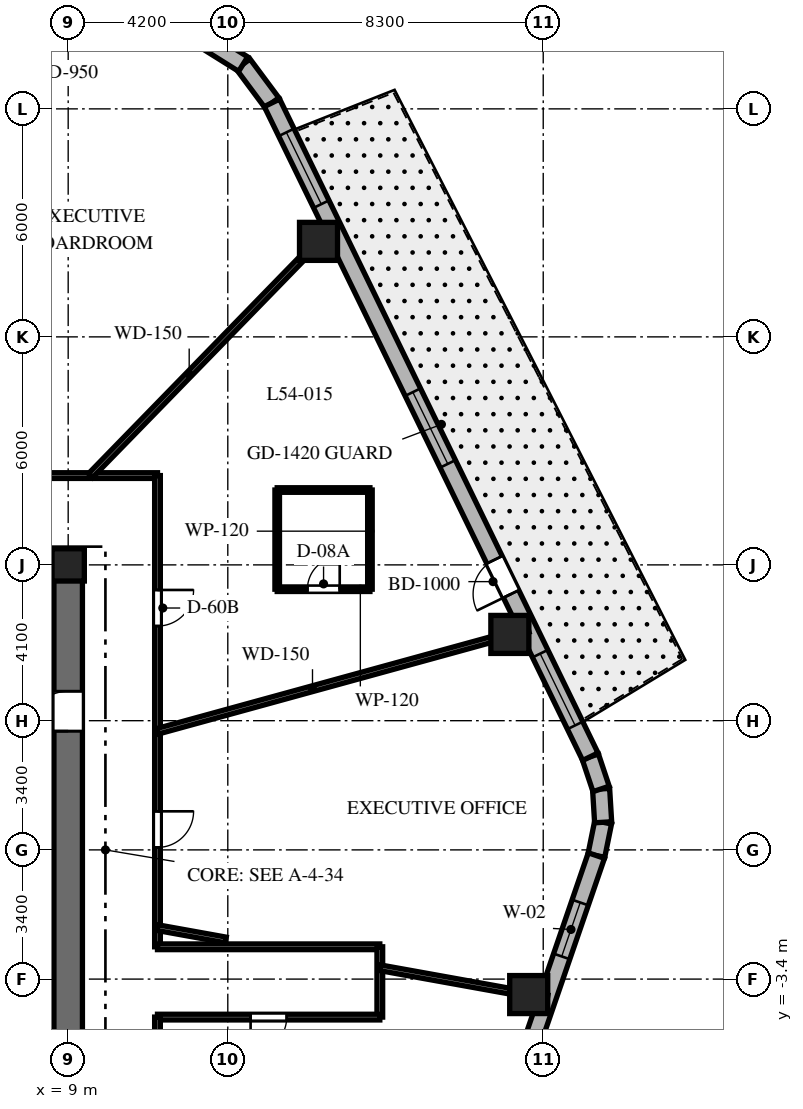
"""IFC4 building model, lengths in metres.
Left out: names, types, materials, properties, quantities, classifications, styles, units other than length and angle.
Written with IfcOpenShell. Run it as: python <this file> out.ifc"""

import sys

from ifc_helpers import new_model, si_unit, direction, frame, frame_2d, origin, origin_2d, place, context, subcontext, project, spatial, rectangle, extrude, element, fill, save


model = new_model("IFC4")
c1 = context("Model", 3, precision=1e-05, world=origin(), true_north=direction((0.0, 1.0)))
c2 = subcontext(c1, "Body", "Model", "MODEL_VIEW")
j1 = project(units=[si_unit("LENGTHUNIT", "METRE"), si_unit("PLANEANGLEUNIT", "RADIAN")], contexts=[c1])
p1 = place(None, origin())
s1 = spatial("IfcSite", under=j1, at=p1, CompositionType="ELEMENT")
p2 = place(p1, origin())
s2 = spatial("IfcBuilding", under=s1, at=p2, CompositionType="ELEMENT")
p3 = place(p2, frame((0.0, 0.0, 217.9)))
s3 = spatial("IfcBuildingStorey", under=s2, at=p3, CompositionType="ELEMENT", Elevation=217.9)
p4 = place(p3, frame((1.85, 7.5, 0.0), z_axis=(0.0, 0.0, 1.0), x_axis=(1.0, 0.0, 0.0)))
e1 = element("IfcWall", 1, at=p4, inside=s3, PredefinedType="SHEAR", context=c2, shape_type="SweptSolid", body=[
    extrude(rectangle(XDim=7.525, YDim=0.75, at=frame_2d((3.762, 0.0))), origin(), (0.0, 0.0, 1.0), 3.8),
])
p5 = place(p3, frame((9.0, -7.125, 0.0), z_axis=(0.0, 0.0, 1.0), x_axis=(0.0, 1.0, 0.0)))
e2 = element("IfcWall", 2, at=p5, inside=s3, PredefinedType="SHEAR", context=c2, shape_type="SweptSolid", body=[
    extrude(rectangle(XDim=14.25, YDim=0.75, at=frame_2d((7.125, 0.0))), origin(), (0.0, 0.0, 1.0), 3.8),
])
p6 = place(p5, frame((10.25, 0.0, 0.0)))
e3 = element("IfcOpeningElement", 3, at=p6, cuts=e2, PredefinedType="OPENING", context=c2, shape_type="SweptSolid", body=[
    extrude(rectangle(XDim=1.05, YDim=2.15, at=frame_2d((0.525, 1.075))), frame((0.0, 0.385, 0.0), z_axis=(0.0, -1.0, 0.0), x_axis=(1.0, 0.0, 0.0)), (0.0, 0.0, 1.0), 0.77),
])
p7 = place(p3, frame((9.0, 7.5, 0.0), z_axis=(0.0, 0.0, 1.0), x_axis=(1.0, 0.0, 0.0)))
e4 = element("IfcColumn", 4, at=p7, inside=s3, PredefinedType="COLUMN", context=c2, shape_type="SweptSolid", body=[
    extrude(rectangle(XDim=0.85, YDim=0.85, at=origin_2d()), origin(), (0.0, 0.0, 1.0), 3.8),
])
for number, where, z_axis, x_axis in (
    (5, (21.118, -3.807, 0.0), (0.0, 0.0, 1.0), (1.0, 0.0, 0.0)),
    (6, (20.622, 5.67, 0.0), (0.0, 0.0, 1.0), (1.0, 0.0, 0.0)),
    (7, (15.587, 16.013, 0.0), (0.0, 0.0, 1.0), (1.0, 0.0, 0.0)),
):
    element("IfcColumn", number, at=place(p3, frame(where, z_axis=z_axis, x_axis=x_axis)), inside=s3, PredefinedType="COLUMN", context=c2, shape_type="SweptSolid", body=[
        extrude(rectangle(XDim=1.0, YDim=1.0, at=origin_2d()), origin(), (0.0, 0.0, 1.0), 3.8),
    ])
p8 = place(p3, frame((22.898, -0.15, 0.0), z_axis=(0.0, 0.0, 1.0), x_axis=(0.199055826889, 0.979988151858, 0.0)))
e8 = element("IfcWall", 8, at=p8, inside=s3, PredefinedType="SOLIDWALL", context=c2, shape_type="SweptSolid", body=[
    extrude(rectangle(XDim=0.894, YDim=0.45, at=frame_2d((0.447, 0.0))), origin(), (0.0, 0.0, 1.0), 3.5),
])
p9 = place(p3, frame((23.076, 0.727, 0.0), z_axis=(0.0, 0.0, 1.0), x_axis=(-0.060805222108, 0.998149650586, 0.0)))
e9 = element("IfcWall", 9, at=p9, inside=s3, PredefinedType="SOLIDWALL", context=c2, shape_type="SweptSolid", body=[
    extrude(rectangle(XDim=0.879, YDim=0.45, at=frame_2d((0.44, 0.0))), origin(), (0.0, 0.0, 1.0), 3.5),
])
p10 = place(p3, frame((23.023, 1.604, 0.0), z_axis=(0.0, 0.0, 1.0), x_axis=(-0.316801227695, 0.948491951537, 0.0)))
e10 = element("IfcWall", 10, at=p10, inside=s3, PredefinedType="SOLIDWALL", context=c2, shape_type="SweptSolid", body=[
    extrude(rectangle(XDim=0.894, YDim=0.45, at=frame_2d((0.447, 0.0))), origin(), (0.0, 0.0, 1.0), 3.5),
])
p11 = place(p3, frame((14.362, 19.658, 0.0), z_axis=(0.0, 0.0, 1.0), x_axis=(-0.596642462792, 0.80250717853, 0.0)))
e11 = element("IfcWall", 11, at=p11, inside=s3, PredefinedType="SOLIDWALL", context=c2, shape_type="SweptSolid", body=[
    extrude(rectangle(XDim=1.27, YDim=0.45, at=frame_2d((0.635, 0.0))), origin(), (0.0, 0.0, 1.0), 3.5),
])
p12 = place(p3, frame((13.604, 20.678, 0.0), z_axis=(0.0, 0.0, 1.0), x_axis=(-0.847910404124, 0.53013955387, 0.0)))
e12 = element("IfcWall", 12, at=p12, inside=s3, PredefinedType="SOLIDWALL", context=c2, shape_type="SweptSolid", body=[
    extrude(rectangle(XDim=1.249, YDim=0.45, at=frame_2d((0.624, 0.0))), origin(), (0.0, 0.0, 1.0), 3.5),
])
p13 = place(p3, frame((16.324, -19.275, 0.0), z_axis=(0.0, 0.0, 1.0), x_axis=(0.325083142304, 0.945685439557, 0.0)))
e13 = element("IfcWall", 13, at=p13, inside=s3, PredefinedType="SOLIDWALL", context=c2, shape_type="SweptSolid", body=[
    extrude(rectangle(XDim=20.224, YDim=0.45, at=frame_2d((10.112, 0.0))), origin(), (0.0, 0.0, 1.0), 3.5),
])
p14 = place(p13, frame((1.253, 0.0, 0.8)))
e14 = element("IfcOpeningElement", 14, at=p14, cuts=e13, PredefinedType="OPENING", context=c2, shape_type="SweptSolid", body=[
    extrude(rectangle(XDim=1.5, YDim=1.8, at=frame_2d((0.75, 0.9))), frame((0.0, 0.235, 0.0), z_axis=(0.0, -1.0, 0.0), x_axis=(1.0, 0.0, 0.0)), (0.0, 0.0, 1.0), 0.47),
])
p15 = place(p13, frame((9.309, 0.0, 0.8)))
e15 = element("IfcOpeningElement", 15, at=p15, cuts=e13, PredefinedType="OPENING", context=c2, shape_type="SweptSolid", body=[
    extrude(rectangle(XDim=1.5, YDim=1.8, at=frame_2d((0.75, 0.9))), frame((0.0, 0.235, 0.0), z_axis=(0.0, -1.0, 0.0), x_axis=(1.0, 0.0, 0.0)), (0.0, 0.0, 1.0), 0.47),
])
p16 = place(p13, frame((17.418, 0.0, 0.8)))
e16 = element("IfcOpeningElement", 16, at=p16, cuts=e13, PredefinedType="OPENING", context=c2, shape_type="SweptSolid", body=[
    extrude(rectangle(XDim=1.5, YDim=1.8, at=frame_2d((0.75, 0.9))), frame((0.0, 0.235, 0.0), z_axis=(0.0, -1.0, 0.0), x_axis=(1.0, 0.0, 0.0)), (0.0, 0.0, 1.0), 0.47),
])
p17 = place(p3, frame((22.74, 2.452, 0.0), z_axis=(0.0, 0.0, 1.0), x_axis=(-0.437753424814, 0.899095066755, 0.0)))
e17 = element("IfcWall", 17, at=p17, inside=s3, PredefinedType="SOLIDWALL", context=c2, shape_type="SweptSolid", body=[
    extrude(rectangle(XDim=19.137, YDim=0.45, at=frame_2d((9.569, 0.0))), origin(), (0.0, 0.0, 1.0), 3.5),
])
p18 = place(p17, frame((4.763, 0.0, 0.0)))
e18 = element("IfcOpeningElement", 18, at=p18, cuts=e17, PredefinedType="OPENING", context=c2, shape_type="SweptSolid", body=[
    extrude(rectangle(XDim=1.0, YDim=2.15, at=frame_2d((0.5, 1.075))), frame((0.0, 0.235, 0.0), z_axis=(0.0, -1.0, 0.0), x_axis=(1.0, 0.0, 0.0)), (0.0, 0.0, 1.0), 0.47),
])
p19 = place(p17, frame((8.57, 0.0, 0.8)))
e19 = element("IfcOpeningElement", 19, at=p19, cuts=e17, PredefinedType="OPENING", context=c2, shape_type="SweptSolid", body=[
    extrude(rectangle(XDim=2.1, YDim=1.85, at=frame_2d((1.05, 0.925))), frame((0.0, 0.235, 0.0), z_axis=(0.0, -1.0, 0.0), x_axis=(1.0, 0.0, 0.0)), (0.0, 0.0, 1.0), 0.47),
])
p20 = place(p17, frame((16.173, 0.0, 0.8)))
e20 = element("IfcOpeningElement", 20, at=p20, cuts=e17, PredefinedType="OPENING", context=c2, shape_type="SweptSolid", body=[
    extrude(rectangle(XDim=2.1, YDim=1.85, at=frame_2d((1.05, 0.925))), frame((0.0, 0.235, 0.0), z_axis=(0.0, -1.0, 0.0), x_axis=(1.0, 0.0, 0.0)), (0.0, 0.0, 1.0), 0.47),
])
p21 = place(p17, frame((0.916, 0.0, 0.8)))
e21 = element("IfcOpeningElement", 21, at=p21, cuts=e17, PredefinedType="OPENING", context=c2, shape_type="SweptSolid", body=[
    extrude(rectangle(XDim=2.1, YDim=1.85, at=frame_2d((1.05, 0.925))), frame((0.0, 0.235, 0.0), z_axis=(0.0, -1.0, 0.0), x_axis=(1.0, 0.0, 0.0)), (0.0, 0.0, 1.0), 0.47),
])
p22 = place(p3, frame((0.92, 9.85, 0.0), z_axis=(0.0, 0.0, 1.0), x_axis=(1.0, 0.0, 0.0)))
e22 = element("IfcWall", 22, at=p22, inside=s3, PredefinedType="PARTITIONING", context=c2, shape_type="SweptSolid", body=[
    extrude(rectangle(XDim=10.43, YDim=0.15, at=frame_2d((5.215, 0.0))), origin(), (0.0, 0.0, 1.0), 2.99),
])
p23 = place(p22, frame((4.949, 0.0, 0.0)))
e23 = element("IfcOpeningElement", 23, at=p23, cuts=e22, PredefinedType="OPENING", context=c2, shape_type="SweptSolid", body=[
    extrude(rectangle(XDim=0.95, YDim=2.03, at=frame_2d((0.475, 1.015))), frame((0.0, 0.085, 0.0), z_axis=(0.0, -1.0, 0.0), x_axis=(1.0, 0.0, 0.0)), (0.0, 0.0, 1.0), 0.17),
])
p24 = place(p3, frame((11.35, 9.85, 0.0), z_axis=(0.0, 0.0, 1.0), x_axis=(0.0, -1.0, 0.0)))
e24 = element("IfcWall", 24, at=p24, inside=s3, PredefinedType="PARTITIONING", context=c2, shape_type="SweptSolid", body=[
    extrude(rectangle(XDim=12.4, YDim=0.15, at=frame_2d((6.2, 0.0))), origin(), (0.0, 0.0, 1.0), 2.99),
])
p25 = place(p24, frame((3.01, 0.0, 0.0)))
e25 = element("IfcOpeningElement", 25, at=p25, cuts=e24, PredefinedType="OPENING", context=c2, shape_type="SweptSolid", body=[
    extrude(rectangle(XDim=0.95, YDim=2.03, at=frame_2d((0.475, 1.015))), frame((0.0, 0.085, 0.0), z_axis=(0.0, -1.0, 0.0), x_axis=(1.0, 0.0, 0.0)), (0.0, 0.0, 1.0), 0.17),
])
p26 = place(p24, frame((8.835, 0.0, 0.0)))
e26 = element("IfcOpeningElement", 26, at=p26, cuts=e24, PredefinedType="OPENING", context=c2, shape_type="SweptSolid", body=[
    extrude(rectangle(XDim=0.95, YDim=2.03, at=frame_2d((0.475, 1.015))), frame((0.0, 0.085, 0.0), z_axis=(0.0, -1.0, 0.0), x_axis=(1.0, 0.0, 0.0)), (0.0, 0.0, 1.0), 0.17),
])
p27 = place(p3, frame((11.35, -2.55, 0.0), z_axis=(0.0, 0.0, 1.0), x_axis=(1.0, 0.0, 0.0)))
e27 = element("IfcWall", 27, at=p27, inside=s3, PredefinedType="PARTITIONING", context=c2, shape_type="SweptSolid", body=[
    extrude(rectangle(XDim=5.85, YDim=0.15, at=frame_2d((2.925, 0.0))), origin(), (0.0, 0.0, 1.0), 2.941),
])
p28 = place(p3, frame((17.2, -2.55, 0.0), z_axis=(0.0, 0.0, 1.0), x_axis=(0.0, -1.0, 0.0)))
e28 = element("IfcWall", 28, at=p28, inside=s3, PredefinedType="PARTITIONING", context=c2, shape_type="SweptSolid", body=[
    extrude(rectangle(XDim=1.85, YDim=0.15, at=frame_2d((0.925, 0.0))), origin(), (0.0, 0.0, 1.0), 2.941),
])
p29 = place(p3, frame((17.2, -4.4, 0.0), z_axis=(0.0, 0.0, 1.0), x_axis=(-1.0, 0.0, 0.0)))
e29 = element("IfcWall", 29, at=p29, inside=s3, PredefinedType="PARTITIONING", context=c2, shape_type="SweptSolid", body=[
    extrude(rectangle(XDim=5.85, YDim=0.15, at=frame_2d((2.925, 0.0))), origin(), (0.0, 0.0, 1.0), 2.941),
])
p30 = place(p29, frame((2.45, 0.0, 0.0)))
e30 = element("IfcOpeningElement", 30, at=p30, cuts=e29, PredefinedType="OPENING", context=c2, shape_type="SweptSolid", body=[
    extrude(rectangle(XDim=0.95, YDim=2.03, at=frame_2d((0.475, 1.015))), frame((0.0, 0.085, 0.0), z_axis=(0.0, -1.0, 0.0), x_axis=(1.0, 0.0, 0.0)), (0.0, 0.0, 1.0), 0.17),
])
p31 = place(p3, frame((11.35, -4.4, 0.0), z_axis=(0.0, 0.0, 1.0), x_axis=(0.0, -1.0, 0.0)))
e31 = element("IfcWall", 31, at=p31, inside=s3, PredefinedType="PARTITIONING", context=c2, shape_type="SweptSolid", body=[
    extrude(rectangle(XDim=5.45, YDim=0.15, at=frame_2d((2.725, 0.0))), origin(), (0.0, 0.0, 1.0), 2.99),
])
p32 = place(p3, frame((11.35, 3.121, 0.0), z_axis=(0.0, 0.0, 1.0), x_axis=(0.964212793822, 0.265129568758, 0.0)))
e32 = element("IfcWall", 32, at=p32, inside=s3, PredefinedType="PARTITIONING", context=c2, shape_type="SweptSolid", body=[
    extrude(rectangle(XDim=10.12, YDim=0.15, at=frame_2d((5.06, 0.0))), origin(), (0.0, 0.0, 1.0), 2.74),
])
p33 = place(p3, frame((9.588, 9.85, 0.0), z_axis=(0.0, 0.0, 1.0), x_axis=(0.697519469595, 0.716565830567, 0.0)))
e33 = element("IfcWall", 33, at=p33, inside=s3, PredefinedType="PARTITIONING", context=c2, shape_type="SweptSolid", body=[
    extrude(rectangle(XDim=9.126, YDim=0.15, at=frame_2d((4.563, 0.0))), origin(), (0.0, 0.0, 1.0), 2.74),
])
p34 = place(p3, frame((11.35, -2.046, 0.0), z_axis=(0.0, 0.0, 1.0), x_axis=(0.984127783205, -0.177461281195, 0.0)))
e34 = element("IfcWall", 34, at=p34, inside=s3, PredefinedType="PARTITIONING", context=c2, shape_type="SweptSolid", body=[
    extrude(rectangle(XDim=1.826, YDim=0.15, at=frame_2d((0.913, 0.0))), origin(), (0.0, 0.0, 1.0), 3.5),
])
p35 = place(p3, frame((17.2, -3.101, 0.0), z_axis=(0.0, 0.0, 1.0), x_axis=(0.98413465883, -0.177423147559, 0.0)))
e35 = element("IfcWall", 35, at=p35, inside=s3, PredefinedType="PARTITIONING", context=c2, shape_type="SweptSolid", body=[
    extrude(rectangle(XDim=4.482, YDim=0.15, at=frame_2d((2.241, 0.0))), origin(), (0.0, 0.0, 1.0), 2.74),
])
p36 = place(p3, frame((14.5, 6.86, 0.0), z_axis=(0.0, 0.0, 1.0), x_axis=(1.0, 0.0, 0.0)))
e36 = element("IfcWall", 36, at=p36, inside=s3, PredefinedType="PARTITIONING", context=c2, shape_type="SweptSolid", body=[
    extrude(rectangle(XDim=2.44, YDim=0.12, at=frame_2d((1.22, 0.0))), origin(), (0.0, 0.0, 1.0), 3.027),
])
p37 = place(p36, frame((0.795, 0.0, 0.0)))
e37 = element("IfcOpeningElement", 37, at=p37, cuts=e36, PredefinedType="OPENING", context=c2, shape_type="SweptSolid", body=[
    extrude(rectangle(XDim=0.85, YDim=2.03, at=frame_2d((0.425, 1.015))), frame((0.0, 0.07, 0.0), z_axis=(0.0, -1.0, 0.0), x_axis=(1.0, 0.0, 0.0)), (0.0, 0.0, 1.0), 0.14),
])
p38 = place(p3, frame((16.94, 6.86, 0.0), z_axis=(0.0, 0.0, 1.0), x_axis=(0.0, 1.0, 0.0)))
e38 = element("IfcWall", 38, at=p38, inside=s3, PredefinedType="PARTITIONING", context=c2, shape_type="SweptSolid", body=[
    extrude(rectangle(XDim=2.61, YDim=0.12, at=frame_2d((1.305, 0.0))), origin(), (0.0, 0.0, 1.0), 3.5),
])
p39 = place(p3, frame((16.94, 9.47, 0.0), z_axis=(0.0, 0.0, 1.0), x_axis=(-1.0, 0.0, 0.0)))
e39 = element("IfcWall", 39, at=p39, inside=s3, PredefinedType="PARTITIONING", context=c2, shape_type="SweptSolid", body=[
    extrude(rectangle(XDim=2.44, YDim=0.12, at=frame_2d((1.22, 0.0))), origin(), (0.0, 0.0, 1.0), 3.027),
])
p40 = place(p3, frame((14.5, 9.47, 0.0), z_axis=(0.0, 0.0, 1.0), x_axis=(0.0, -1.0, 0.0)))
e40 = element("IfcWall", 40, at=p40, inside=s3, PredefinedType="PARTITIONING", context=c2, shape_type="SweptSolid", body=[
    extrude(rectangle(XDim=2.61, YDim=0.12, at=frame_2d((1.305, 0.0))), origin(), (0.0, 0.0, 1.0), 3.5),
])
p41 = place(p16, origin())
e41 = element("IfcWindow", 41, at=p41, inside=s3, PartitioningType="SINGLE_PANEL", PredefinedType="WINDOW", context=c2, shape_type="SweptSolid", body=[
    extrude(rectangle(XDim=1.5, YDim=1.8, at=frame_2d((0.75, 0.9))), frame((0.0, 0.03, 0.0), z_axis=(0.0, -1.0, 0.0), x_axis=(1.0, 0.0, 0.0)), (0.0, 0.0, 1.0), 0.06),
])
fill(e16, e41)
p42 = place(p18, origin())
e42 = element("IfcDoor", 42, at=p42, inside=s3, OperationType="SINGLE_SWING_LEFT", PredefinedType="DOOR", context=c2, shape_type="SweptSolid", body=[
    extrude(rectangle(XDim=1.0, YDim=2.15, at=frame_2d((0.5, 1.075))), frame((0.0, 0.025, 0.0), z_axis=(0.0, -1.0, 0.0), x_axis=(1.0, 0.0, 0.0)), (0.0, 0.0, 1.0), 0.05),
])
fill(e18, e42)
p43 = place(p19, origin())
e43 = element("IfcWindow", 43, at=p43, inside=s3, PartitioningType="SINGLE_PANEL", PredefinedType="WINDOW", context=c2, shape_type="SweptSolid", body=[
    extrude(rectangle(XDim=2.1, YDim=1.85, at=frame_2d((1.05, 0.925))), frame((0.0, 0.03, 0.0), z_axis=(0.0, -1.0, 0.0), x_axis=(1.0, 0.0, 0.0)), (0.0, 0.0, 1.0), 0.06),
])
fill(e19, e43)
p44 = place(p20, origin())
e44 = element("IfcWindow", 44, at=p44, inside=s3, PartitioningType="SINGLE_PANEL", PredefinedType="WINDOW", context=c2, shape_type="SweptSolid", body=[
    extrude(rectangle(XDim=2.1, YDim=1.85, at=frame_2d((1.05, 0.925))), frame((0.0, 0.03, 0.0), z_axis=(0.0, -1.0, 0.0), x_axis=(1.0, 0.0, 0.0)), (0.0, 0.0, 1.0), 0.06),
])
fill(e20, e44)
p45 = place(p21, origin())
e45 = element("IfcWindow", 45, at=p45, inside=s3, PartitioningType="SINGLE_PANEL", PredefinedType="WINDOW", context=c2, shape_type="SweptSolid", body=[
    extrude(rectangle(XDim=2.1, YDim=1.85, at=frame_2d((1.05, 0.925))), frame((0.0, 0.03, 0.0), z_axis=(0.0, -1.0, 0.0), x_axis=(1.0, 0.0, 0.0)), (0.0, 0.0, 1.0), 0.06),
])
fill(e21, e45)
p46 = place(p6, origin())
e46 = element("IfcDoor", 46, at=p46, inside=s3, OperationType="SINGLE_SWING_LEFT", PredefinedType="DOOR", context=c2, shape_type="SweptSolid", body=[
    extrude(rectangle(XDim=1.05, YDim=2.15, at=frame_2d((0.525, 1.075))), frame((0.0, 0.025, 0.0), z_axis=(0.0, -1.0, 0.0), x_axis=(1.0, 0.0, 0.0)), (0.0, 0.0, 1.0), 0.05),
])
fill(e3, e46)
p47 = place(p25, origin())
e47 = element("IfcDoor", 47, at=p47, inside=s3, OperationType="SINGLE_SWING_LEFT", PredefinedType="DOOR", context=c2, shape_type="SweptSolid", body=[
    extrude(rectangle(XDim=0.95, YDim=2.03, at=frame_2d((0.475, 1.015))), frame((0.0, 0.025, 0.0), z_axis=(0.0, -1.0, 0.0), x_axis=(1.0, 0.0, 0.0)), (0.0, 0.0, 1.0), 0.05),
])
fill(e25, e47)
p48 = place(p37, origin())
e48 = element("IfcDoor", 48, at=p48, inside=s3, OperationType="SINGLE_SWING_RIGHT", PredefinedType="DOOR", context=c2, shape_type="SweptSolid", body=[
    extrude(rectangle(XDim=0.85, YDim=2.03, at=frame_2d((0.425, 1.015))), frame((0.0, 0.025, 0.0), z_axis=(0.0, -1.0, 0.0), x_axis=(1.0, 0.0, 0.0)), (0.0, 0.0, 1.0), 0.05),
])
fill(e37, e48)
p49 = place(p30, origin())
e49 = element("IfcDoor", 49, at=p49, inside=s3, OperationType="SINGLE_SWING_RIGHT", PredefinedType="DOOR", context=c2, shape_type="SweptSolid", body=[
    extrude(rectangle(XDim=0.95, YDim=2.03, at=frame_2d((0.475, 1.015))), frame((0.0, 0.025, 0.0), z_axis=(0.0, -1.0, 0.0), x_axis=(1.0, 0.0, 0.0)), (0.0, 0.0, 1.0), 0.05),
])
fill(e30, e49)
p50 = place(p26, origin())
e50 = element("IfcDoor", 50, at=p50, inside=s3, OperationType="SINGLE_SWING_LEFT", PredefinedType="DOOR", context=c2, shape_type="SweptSolid", body=[
    extrude(rectangle(XDim=0.95, YDim=2.03, at=frame_2d((0.475, 1.015))), frame((0.0, 0.025, 0.0), z_axis=(0.0, -1.0, 0.0), x_axis=(1.0, 0.0, 0.0)), (0.0, 0.0, 1.0), 0.05),
])
fill(e26, e50)
save(model, sys.argv[1])
